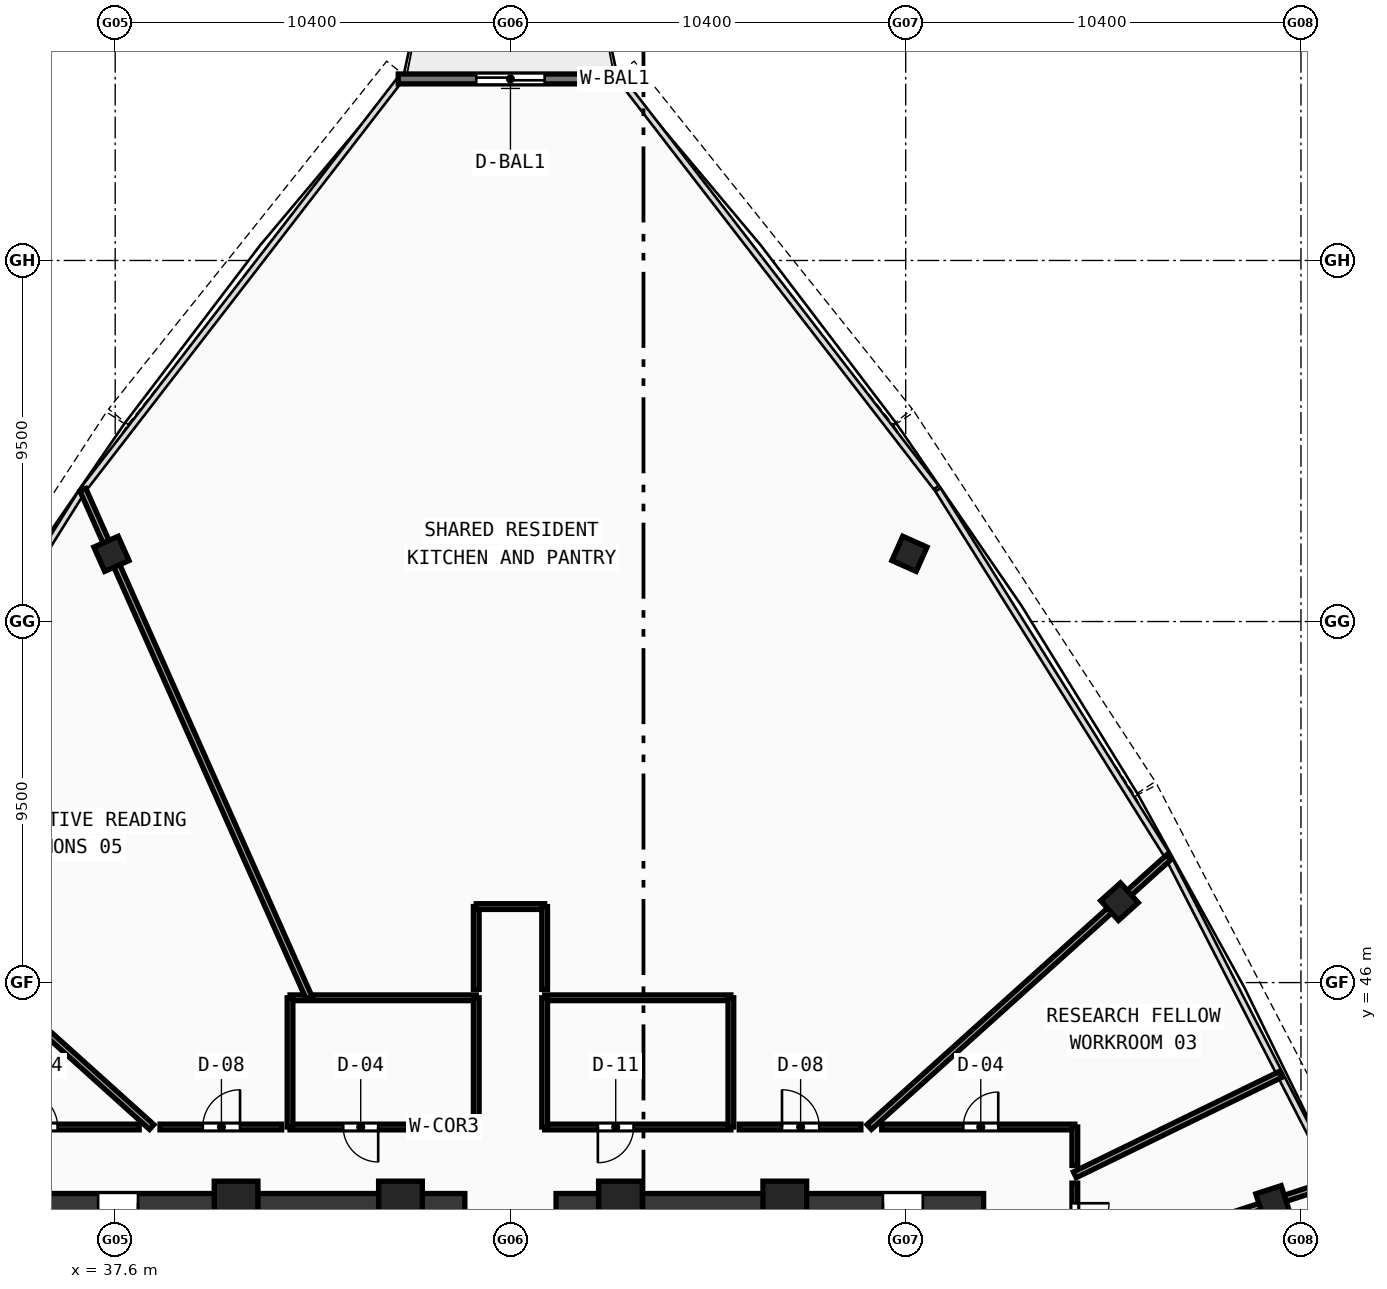
"""IFC4 building model, lengths in metres.
Left out: names, types, materials, properties, quantities, classifications, styles, units other than length and angle.
Written with IfcOpenShell. Run it as: python <this file> out.ifc"""

import sys

from ifc_helpers import new_model, si_unit, direction, frame, frame_2d, origin, origin_with_axes, origin_2d, place, context, subcontext, project, spatial, rectangle, hollow_rectangle, extrude, source, transform, mapped, element, fill, save


model = new_model("IFC4")
c1 = context("Model", 3, precision=1e-05, world=origin(), true_north=direction((0.0, 1.0)))
c2 = subcontext(c1, "Body", "Model", "MODEL_VIEW")
j1 = project(units=[si_unit("LENGTHUNIT", "METRE"), si_unit("PLANEANGLEUNIT", "RADIAN")], contexts=[c1])
p1 = place(None, origin())
s1 = spatial("IfcSite", under=j1, at=p1, CompositionType="ELEMENT")
p2 = place(p1, origin())
s2 = spatial("IfcBuilding", under=s1, at=p2, CompositionType="ELEMENT")
p3 = place(p2, frame((0.0, 0.0, 359.26)))
s3 = spatial("IfcBuildingStorey", under=s2, at=p3, CompositionType="ELEMENT", Elevation=359.26)
p4 = place(p3, frame((35.55, 40.2, 0.0), z_axis=(0.0, 0.0, 1.0), x_axis=(1.0, 0.0, 0.0)))
e1 = element("IfcWall", 1, at=p4, inside=s3, PredefinedType="SHEAR", context=c2, shape_type="SweptSolid", body=[
    extrude(rectangle(XDim=11.25, YDim=0.5, at=frame_2d((5.625, 0.0))), origin(), (0.0, 0.0, 1.0), 3.49),
])
p5 = place(p4, frame((1.6, 0.0, 0.0)))
e2 = element("IfcOpeningElement", 2, at=p5, cuts=e1, PredefinedType="OPENING", context=c2, shape_type="SweptSolid", body=[
    extrude(rectangle(XDim=1.05, YDim=2.1, at=frame_2d((0.525, 1.05))), frame((0.0, 0.26, 0.0), z_axis=(0.0, -1.0, 0.0), x_axis=(1.0, 0.0, 0.0)), (0.0, 0.0, 1.0), 0.52),
])
p6 = place(p3, frame((49.2, 40.2, 0.0), z_axis=(0.0, 0.0, 1.0), x_axis=(1.0, 0.0, 0.0)))
e3 = element("IfcWall", 3, at=p6, inside=s3, PredefinedType="SHEAR", context=c2, shape_type="SweptSolid", body=[
    extrude(rectangle(XDim=11.25, YDim=0.5, at=frame_2d((5.625, 0.0))), origin(), (0.0, 0.0, 1.0), 3.49),
])
p7 = place(p6, frame((8.6, 0.0, 0.0)))
e4 = element("IfcOpeningElement", 4, at=p7, cuts=e3, PredefinedType="OPENING", context=c2, shape_type="SweptSolid", body=[
    extrude(rectangle(XDim=1.05, YDim=2.1, at=frame_2d((0.525, 1.05))), frame((0.0, 0.26, 0.0), z_axis=(0.0, -1.0, 0.0), x_axis=(1.0, 0.0, 0.0)), (0.0, 0.0, 1.0), 0.52),
])
m1 = source(origin(), c2, "Body", "SweptSolid", [
    extrude(hollow_rectangle(XDim=1.15, YDim=1.15, WallThickness=0.048, at=origin_2d()), origin(), (0.0, 0.0, 1.0), 3.75),
])
for number, where, z_axis, x_axis in (
    (5, (55.219, 40.2, -0.26), (0.0, 0.0, 1.0), (1.0, 0.0, 0.0)),
    (6, (50.894, 40.2, -0.26), (0.0, 0.0, 1.0), (1.0, 0.0, 0.0)),
    (7, (45.106, 40.2, -0.26), (0.0, 0.0, 1.0), (1.0, 0.0, 0.0)),
    (8, (40.781, 40.2, -0.26), (0.0, 0.0, 1.0), (1.0, 0.0, 0.0)),
):
    element("IfcColumn", number, at=place(p3, frame(where, z_axis=z_axis, x_axis=x_axis)), inside=s3, PredefinedType="COLUMN", context=c2, shape_type="MappedRepresentation", body=[
        mapped(m1, transform((0.0, 0.0, 0.0), scale=1.0)),
    ])
m2 = source(origin(), c2, "Body", "SweptSolid", [
    extrude(hollow_rectangle(XDim=0.7, YDim=0.7, WallThickness=0.026, at=origin_2d()), origin(), (0.0, 0.0, 1.0), 3.75),
])
for number, where, z_axis, x_axis in (
    (9, (68.053, 40.216, -0.26), (0.0, 0.0, 1.0), (-0.309, 0.951, 0.0)),
    (10, (64.025, 48.129, -0.26), (0.0, 0.0, 1.0), (-0.669, 0.743, 0.0)),
    (11, (58.499, 57.281, -0.26), (0.0, 0.0, 1.0), (-0.914, 0.407, 0.0)),
    (12, (37.501, 57.281, -0.26), (0.0, 0.0, 1.0), (-0.914, -0.407, 0.0)),
):
    element("IfcColumn", number, at=place(p3, frame(where, z_axis=z_axis, x_axis=x_axis)), inside=s3, PredefinedType="COLUMN", context=c2, shape_type="MappedRepresentation", body=[
        mapped(m2, transform((0.0, 0.0, 0.0), scale=1.0)),
    ])
p8 = place(p3, frame((50.952, 69.776, 0.0), z_axis=(0.0, 0.0, 1.0), x_axis=(-1.0, 0.0, 0.0)))
e13 = element("IfcWall", 13, at=p8, inside=s3, PredefinedType="STANDARD", context=c2, shape_type="SweptSolid", body=[
    extrude(rectangle(XDim=5.904, YDim=0.26, at=frame_2d((2.952, 0.0))), origin(), (0.0, 0.0, 1.0), 3.49),
])
p9 = place(p8, frame((2.052, 0.0, 0.0)))
e14 = element("IfcOpeningElement", 14, at=p9, cuts=e13, PredefinedType="OPENING", context=c2, shape_type="SweptSolid", body=[
    extrude(rectangle(XDim=1.8, YDim=2.15, at=frame_2d((0.9, 1.075))), frame((0.0, 0.14, 0.0), z_axis=(0.0, -1.0, 0.0), x_axis=(1.0, 0.0, 0.0)), (0.0, 0.0, 1.0), 0.28),
])
p10 = place(p3, frame((42.2, 42.2, 0.0), z_axis=(0.0, 0.0, 1.0), x_axis=(1.0, 0.0, 0.0)))
e15 = element("IfcWall", 15, at=p10, inside=s3, PredefinedType="PARTITIONING", context=c2, shape_type="SweptSolid", body=[
    extrude(rectangle(XDim=4.9, YDim=0.15, at=frame_2d((2.45, 0.0))), origin(), (0.0, 0.0, 1.0), 2.89),
])
p11 = place(p10, frame((1.4, 0.0, 0.0)))
e16 = element("IfcOpeningElement", 16, at=p11, cuts=e15, PredefinedType="OPENING", context=c2, shape_type="SweptSolid", body=[
    extrude(rectangle(XDim=0.92, YDim=2.1, at=frame_2d((0.46, 1.05))), frame((0.0, 0.085, 0.0), z_axis=(0.0, -1.0, 0.0), x_axis=(1.0, 0.0, 0.0)), (0.0, 0.0, 1.0), 0.17),
])
p12 = place(p3, frame((42.2, 45.6, 0.0), z_axis=(0.0, 0.0, 1.0), x_axis=(1.0, 0.0, 0.0)))
e17 = element("IfcWall", 17, at=p12, inside=s3, PredefinedType="PARTITIONING", context=c2, shape_type="SweptSolid", body=[
    extrude(rectangle(XDim=4.9, YDim=0.15, at=frame_2d((2.45, 0.0))), origin(), (0.0, 0.0, 1.0), 2.89),
])
for number, where, z_axis, x_axis in (
    (18, (42.2, 42.2, 0.0), (0.0, 0.0, 1.0), (0.0, 1.0, 0.0)),
    (19, (47.1, 42.2, 0.0), (0.0, 0.0, 1.0), (0.0, 1.0, 0.0)),
):
    element("IfcWall", number, at=place(p3, frame(where, z_axis=z_axis, x_axis=x_axis)), inside=s3, PredefinedType="PARTITIONING", context=c2, shape_type="SweptSolid", body=[
        extrude(rectangle(XDim=3.4, YDim=0.15, at=frame_2d((1.7, 0.0))), origin(), (0.0, 0.0, 1.0), 3.49),
    ])
p13 = place(p3, frame((48.9, 42.2, 0.0), z_axis=(0.0, 0.0, 1.0), x_axis=(1.0, 0.0, 0.0)))
e20 = element("IfcWall", 20, at=p13, inside=s3, PredefinedType="PARTITIONING", context=c2, shape_type="SweptSolid", body=[
    extrude(rectangle(XDim=4.9, YDim=0.15, at=frame_2d((2.45, 0.0))), origin(), (0.0, 0.0, 1.0), 2.89),
])
p14 = place(p13, frame((1.4, 0.0, 0.0)))
e21 = element("IfcOpeningElement", 21, at=p14, cuts=e20, PredefinedType="OPENING", context=c2, shape_type="SweptSolid", body=[
    extrude(rectangle(XDim=0.94, YDim=2.1, at=frame_2d((0.47, 1.05))), frame((0.0, 0.085, 0.0), z_axis=(0.0, -1.0, 0.0), x_axis=(1.0, 0.0, 0.0)), (0.0, 0.0, 1.0), 0.17),
])
p15 = place(p3, frame((48.9, 45.6, 0.0), z_axis=(0.0, 0.0, 1.0), x_axis=(1.0, 0.0, 0.0)))
e22 = element("IfcWall", 22, at=p15, inside=s3, PredefinedType="PARTITIONING", context=c2, shape_type="SweptSolid", body=[
    extrude(rectangle(XDim=4.9, YDim=0.15, at=frame_2d((2.45, 0.0))), origin(), (0.0, 0.0, 1.0), 2.89),
])
for number, where, z_axis, x_axis in (
    (23, (48.9, 42.2, 0.0), (0.0, 0.0, 1.0), (0.0, 1.0, 0.0)),
    (24, (53.8, 42.2, 0.0), (0.0, 0.0, 1.0), (0.0, 1.0, 0.0)),
):
    element("IfcWall", number, at=place(p3, frame(where, z_axis=z_axis, x_axis=x_axis)), inside=s3, PredefinedType="PARTITIONING", context=c2, shape_type="SweptSolid", body=[
        extrude(rectangle(XDim=3.4, YDim=0.15, at=frame_2d((1.7, 0.0))), origin(), (0.0, 0.0, 1.0), 3.49),
    ])
p16 = place(p3, frame((62.85, 38.525, 0.0), z_axis=(0.0, 0.0, 1.0), x_axis=(0.951060950279, 0.309003347644, 0.0)))
e25 = element("IfcWall", 25, at=p16, inside=s3, PredefinedType="PARTITIONING", context=c2, shape_type="SweptSolid", body=[
    extrude(rectangle(XDim=7.207, YDim=0.17, at=frame_2d((3.604, 0.0))), origin(), (0.0, 0.0, 1.0), 2.89),
])
p17 = place(p3, frame((62.85, 40.943, 0.0), z_axis=(0.0, 0.0, 1.0), x_axis=(0.898803189206, 0.438352400557, 0.0)))
e26 = element("IfcWall", 26, at=p17, inside=s3, PredefinedType="PARTITIONING", context=c2, shape_type="SweptSolid", body=[
    extrude(rectangle(XDim=6.01, YDim=0.17, at=frame_2d((3.005, 0.0))), origin(), (0.0, 0.0, 1.0), 2.89),
])
p18 = place(p3, frame((57.44, 42.2, 0.0), z_axis=(0.0, 0.0, 1.0), x_axis=(0.743152066897, 0.66912256386, 0.0)))
e27 = element("IfcWall", 27, at=p18, inside=s3, PredefinedType="PARTITIONING", context=c2, shape_type="SweptSolid", body=[
    extrude(rectangle(XDim=10.596, YDim=0.17, at=frame_2d((5.298, 0.0))), origin(), (0.0, 0.0, 1.0), 2.89),
])
p19 = place(p3, frame((42.702, 45.6, 0.0), z_axis=(0.0, 0.0, 1.0), x_axis=(-0.406749951551, 0.913539532212, 0.0)))
e28 = element("IfcWall", 28, at=p19, inside=s3, PredefinedType="PARTITIONING", context=c2, shape_type="SweptSolid", body=[
    extrude(rectangle(XDim=14.63, YDim=0.17, at=frame_2d((7.315, 0.0))), origin(), (0.0, 0.0, 1.0), 2.89),
])
p20 = place(p3, frame((38.56, 42.2, 0.0), z_axis=(0.0, 0.0, 1.0), x_axis=(-0.743152066897, 0.66912256386, 0.0)))
e29 = element("IfcWall", 29, at=p20, inside=s3, PredefinedType="PARTITIONING", context=c2, shape_type="SweptSolid", body=[
    extrude(rectangle(XDim=10.596, YDim=0.17, at=frame_2d((5.298, 0.0))), origin(), (0.0, 0.0, 1.0), 2.89),
])
p21 = place(p3, frame((33.15, 42.2, 0.0), z_axis=(0.0, 0.0, 1.0), x_axis=(1.0, 0.0, 0.0)))
e30 = element("IfcWall", 30, at=p21, inside=s3, PredefinedType="PARTITIONING", context=c2, shape_type="SweptSolid", body=[
    extrude(rectangle(XDim=5.081, YDim=0.15, at=frame_2d((2.541, 0.0))), origin(), (0.0, 0.0, 1.0), 3.14),
])
p22 = place(p21, frame((2.015, 0.0, 0.0)))
e31 = element("IfcOpeningElement", 31, at=p22, cuts=e30, PredefinedType="OPENING", context=c2, shape_type="SweptSolid", body=[
    extrude(rectangle(XDim=0.92, YDim=2.1, at=frame_2d((0.46, 1.05))), frame((0.0, 0.085, 0.0), z_axis=(0.0, -1.0, 0.0), x_axis=(1.0, 0.0, 0.0)), (0.0, 0.0, 1.0), 0.17),
])
p23 = place(p3, frame((38.78, 42.2, 0.0), z_axis=(0.0, 0.0, 1.0), x_axis=(1.0, 0.0, 0.0)))
e32 = element("IfcWall", 32, at=p23, inside=s3, PredefinedType="PARTITIONING", context=c2, shape_type="SweptSolid", body=[
    extrude(rectangle(XDim=3.2, YDim=0.15, at=frame_2d((1.6, 0.0))), origin(), (0.0, 0.0, 1.0), 2.89),
])
p24 = place(p23, frame((1.125, 0.0, 0.0)))
e33 = element("IfcOpeningElement", 33, at=p24, cuts=e32, PredefinedType="OPENING", context=c2, shape_type="SweptSolid", body=[
    extrude(rectangle(XDim=0.98, YDim=2.12, at=frame_2d((0.49, 1.06))), frame((0.0, 0.085, 0.0), z_axis=(0.0, -1.0, 0.0), x_axis=(1.0, 0.0, 0.0)), (0.0, 0.0, 1.0), 0.17),
])
p25 = place(p3, frame((47.1, 45.82, 0.0), z_axis=(0.0, 0.0, 1.0), x_axis=(0.0, 1.0, 0.0)))
e34 = element("IfcWall", 34, at=p25, inside=s3, PredefinedType="PARTITIONING", context=c2, shape_type="SweptSolid", body=[
    extrude(rectangle(XDim=2.18, YDim=0.15, at=frame_2d((1.09, 0.0))), origin(), (0.0, 0.0, 1.0), 3.14),
])
p26 = place(p3, frame((47.1, 48.0, 0.0), z_axis=(0.0, 0.0, 1.0), x_axis=(1.0, 0.0, 0.0)))
e35 = element("IfcWall", 35, at=p26, inside=s3, PredefinedType="PARTITIONING", context=c2, shape_type="SweptSolid", body=[
    extrude(rectangle(XDim=1.8, YDim=0.15, at=frame_2d((0.9, 0.0))), origin(), (0.0, 0.0, 1.0), 3.49),
])
p27 = place(p3, frame((48.9, 48.0, 0.0), z_axis=(0.0, 0.0, 1.0), x_axis=(0.0, -1.0, 0.0)))
e36 = element("IfcWall", 36, at=p27, inside=s3, PredefinedType="PARTITIONING", context=c2, shape_type="SweptSolid", body=[
    extrude(rectangle(XDim=2.18, YDim=0.15, at=frame_2d((1.09, 0.0))), origin(), (0.0, 0.0, 1.0), 3.14),
])
p28 = place(p3, frame((54.02, 42.2, 0.0), z_axis=(0.0, 0.0, 1.0), x_axis=(1.0, 0.0, 0.0)))
e37 = element("IfcWall", 37, at=p28, inside=s3, PredefinedType="PARTITIONING", context=c2, shape_type="SweptSolid", body=[
    extrude(rectangle(XDim=3.2, YDim=0.15, at=frame_2d((1.6, 0.0))), origin(), (0.0, 0.0, 1.0), 2.89),
])
p29 = place(p28, frame((1.125, 0.0, 0.0)))
e38 = element("IfcOpeningElement", 38, at=p29, cuts=e37, PredefinedType="OPENING", context=c2, shape_type="SweptSolid", body=[
    extrude(rectangle(XDim=0.98, YDim=2.12, at=frame_2d((0.49, 1.06))), frame((0.0, 0.085, 0.0), z_axis=(0.0, -1.0, 0.0), x_axis=(1.0, 0.0, 0.0)), (0.0, 0.0, 1.0), 0.17),
])
p30 = place(p3, frame((57.769, 42.2, 0.0), z_axis=(0.0, 0.0, 1.0), x_axis=(1.0, 0.0, 0.0)))
e39 = element("IfcWall", 39, at=p30, inside=s3, PredefinedType="PARTITIONING", context=c2, shape_type="SweptSolid", body=[
    extrude(rectangle(XDim=5.081, YDim=0.15, at=frame_2d((2.541, 0.0))), origin(), (0.0, 0.0, 1.0), 3.14),
])
p31 = place(p30, frame((2.146, 0.0, 0.0)))
e40 = element("IfcOpeningElement", 40, at=p31, cuts=e39, PredefinedType="OPENING", context=c2, shape_type="SweptSolid", body=[
    extrude(rectangle(XDim=0.92, YDim=2.1, at=frame_2d((0.46, 1.05))), frame((0.0, 0.085, 0.0), z_axis=(0.0, -1.0, 0.0), x_axis=(1.0, 0.0, 0.0)), (0.0, 0.0, 1.0), 0.17),
])
p32 = place(p3, frame((62.85, 42.2, 0.0), z_axis=(0.0, 0.0, 1.0), x_axis=(0.0, -1.0, 0.0)))
e41 = element("IfcWall", 41, at=p32, inside=s3, PredefinedType="PARTITIONING", context=c2, shape_type="SweptSolid", body=[
    extrude(rectangle(XDim=1.012, YDim=0.15, at=frame_2d((0.506, 0.0))), origin(), (0.0, 0.0, 1.0), 3.49),
])
p33 = place(p3, frame((62.85, 40.723, 0.0), z_axis=(0.0, 0.0, 1.0), x_axis=(0.0, -1.0, 0.0)))
e42 = element("IfcWall", 42, at=p33, inside=s3, PredefinedType="PARTITIONING", context=c2, shape_type="SweptSolid", body=[
    extrude(rectangle(XDim=1.967, YDim=0.15, at=frame_2d((0.983, 0.0))), origin(), (0.0, 0.0, 1.0), 3.14),
])
p34 = place(p33, frame((0.529, 0.0, 0.0)))
e43 = element("IfcOpeningElement", 43, at=p34, cuts=e42, PredefinedType="OPENING", context=c2, shape_type="SweptSolid", body=[
    extrude(rectangle(XDim=0.9, YDim=2.08, at=frame_2d((0.45, 1.04))), frame((0.0, 0.085, 0.0), z_axis=(0.0, -1.0, 0.0), x_axis=(1.0, 0.0, 0.0)), (0.0, 0.0, 1.0), 0.17),
])
m3 = source(origin(), c2, "Body", "SweptSolid", [
    extrude(rectangle(XDim=1.8, YDim=2.15, at=frame_2d((0.9, 1.075))), frame((0.0, 0.025, 0.0), z_axis=(0.0, -1.0, 0.0), x_axis=(1.0, 0.0, 0.0)), (0.0, 0.0, 1.0), 0.05),
])
p35 = place(p9, origin_with_axes())
e44 = element("IfcDoor", 44, at=p35, inside=s3, OperationType="DOUBLE_DOOR_SLIDING", PredefinedType="DOOR", context=c2, shape_type="MappedRepresentation", body=[
    mapped(m3, transform((0.0, 0.0, 0.0), scale=1.0)),
])
fill(e14, e44)
m4 = source(origin(), c2, "Body", "SweptSolid", [
    extrude(rectangle(XDim=1.05, YDim=2.1, at=frame_2d((0.525, 1.05))), frame((0.0, 0.025, 0.0), z_axis=(0.0, -1.0, 0.0), x_axis=(1.0, 0.0, 0.0)), (0.0, 0.0, 1.0), 0.05),
])
p36 = place(p5, frame((1.05, 0.0, 0.0), z_axis=(0.0, 0.0, 1.0), x_axis=(-1.0, 0.0, 0.0)))
e45 = element("IfcDoor", 45, at=p36, inside=s3, OperationType="SINGLE_SWING_LEFT", PredefinedType="DOOR", context=c2, shape_type="MappedRepresentation", body=[
    mapped(m4, transform((0.0, 0.0, 0.0), scale=1.0)),
])
fill(e2, e45)
p37 = place(p7, frame((1.05, 0.0, 0.0), z_axis=(0.0, 0.0, 1.0), x_axis=(-1.0, 0.0, 0.0)))
e46 = element("IfcDoor", 46, at=p37, inside=s3, OperationType="SINGLE_SWING_RIGHT", PredefinedType="DOOR", context=c2, shape_type="MappedRepresentation", body=[
    mapped(m4, transform((0.0, 0.0, 0.0), scale=1.0)),
])
fill(e4, e46)
m5 = source(origin(), c2, "Body", "SweptSolid", [
    extrude(rectangle(XDim=0.92, YDim=2.1, at=frame_2d((0.46, 1.05))), frame((0.0, 0.025, 0.0), z_axis=(0.0, -1.0, 0.0), x_axis=(1.0, 0.0, 0.0)), (0.0, 0.0, 1.0), 0.05),
])
p38 = place(p11, frame((0.92, 0.0, 0.0), z_axis=(0.0, 0.0, 1.0), x_axis=(-1.0, 0.0, 0.0)))
e47 = element("IfcDoor", 47, at=p38, inside=s3, OperationType="SINGLE_SWING_LEFT", PredefinedType="DOOR", context=c2, shape_type="MappedRepresentation", body=[
    mapped(m5, transform((0.0, 0.0, 0.0), scale=1.0)),
])
fill(e16, e47)
m6 = source(origin(), c2, "Body", "SweptSolid", [
    extrude(rectangle(XDim=0.94, YDim=2.1, at=frame_2d((0.47, 1.05))), frame((0.0, 0.025, 0.0), z_axis=(0.0, -1.0, 0.0), x_axis=(1.0, 0.0, 0.0)), (0.0, 0.0, 1.0), 0.05),
])
p39 = place(p14, frame((0.94, 0.0, 0.0), z_axis=(0.0, 0.0, 1.0), x_axis=(-1.0, 0.0, 0.0)))
e48 = element("IfcDoor", 48, at=p39, inside=s3, OperationType="SINGLE_SWING_RIGHT", PredefinedType="DOOR", context=c2, shape_type="MappedRepresentation", body=[
    mapped(m6, transform((0.0, 0.0, 0.0), scale=1.0)),
])
fill(e21, e48)
m7 = source(origin(), c2, "Body", "SweptSolid", [
    extrude(rectangle(XDim=0.9, YDim=2.08, at=frame_2d((0.45, 1.04))), frame((0.0, 0.025, 0.0), z_axis=(0.0, -1.0, 0.0), x_axis=(1.0, 0.0, 0.0)), (0.0, 0.0, 1.0), 0.05),
])
p40 = place(p34, origin_with_axes())
e49 = element("IfcDoor", 49, at=p40, inside=s3, OperationType="SINGLE_SWING_LEFT", PredefinedType="DOOR", context=c2, shape_type="MappedRepresentation", body=[
    mapped(m7, transform((0.0, 0.0, 0.0), scale=1.0)),
])
fill(e43, e49)
p41 = place(p31, origin_with_axes())
e50 = element("IfcDoor", 50, at=p41, inside=s3, OperationType="SINGLE_SWING_RIGHT", PredefinedType="DOOR", context=c2, shape_type="MappedRepresentation", body=[
    mapped(m5, transform((0.0, 0.0, 0.0), scale=1.0)),
])
fill(e40, e50)
m8 = source(origin(), c2, "Body", "SweptSolid", [
    extrude(rectangle(XDim=0.98, YDim=2.12, at=frame_2d((0.49, 1.06))), frame((0.0, 0.025, 0.0), z_axis=(0.0, -1.0, 0.0), x_axis=(1.0, 0.0, 0.0)), (0.0, 0.0, 1.0), 0.05),
])
p42 = place(p29, origin_with_axes())
e51 = element("IfcDoor", 51, at=p42, inside=s3, OperationType="SINGLE_SWING_LEFT", PredefinedType="DOOR", context=c2, shape_type="MappedRepresentation", body=[
    mapped(m8, transform((0.0, 0.0, 0.0), scale=1.0)),
])
fill(e38, e51)
p43 = place(p24, origin_with_axes())
e52 = element("IfcDoor", 52, at=p43, inside=s3, OperationType="SINGLE_SWING_RIGHT", PredefinedType="DOOR", context=c2, shape_type="MappedRepresentation", body=[
    mapped(m8, transform((0.0, 0.0, 0.0), scale=1.0)),
])
fill(e33, e52)
p44 = place(p22, origin_with_axes())
e53 = element("IfcDoor", 53, at=p44, inside=s3, OperationType="SINGLE_SWING_LEFT", PredefinedType="DOOR", context=c2, shape_type="MappedRepresentation", body=[
    mapped(m5, transform((0.0, 0.0, 0.0), scale=1.0)),
])
fill(e31, e53)
save(model, sys.argv[1])
